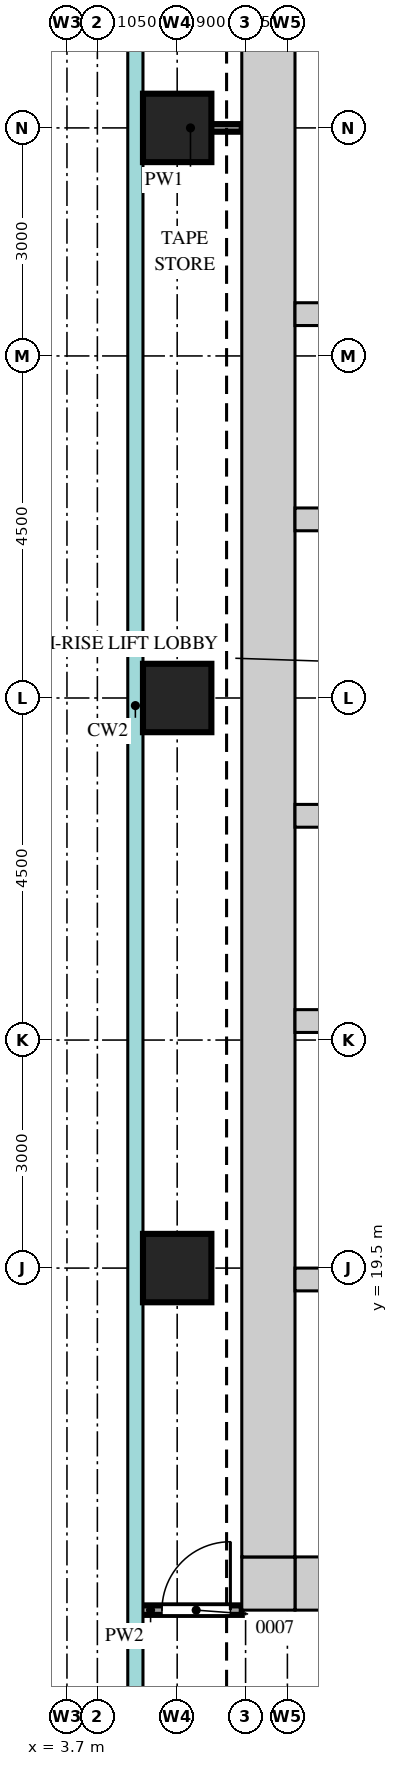
"""IFC4 building model, lengths in metres.
Left out: names, types, materials, properties, quantities, classifications, styles, units other than length and angle.
Written with IfcOpenShell. Run it as: python <this file> out.ifc"""

import sys

from ifc_helpers import new_model, si_unit, direction, frame, frame_2d, origin, origin_2d, place, context, subcontext, project, spatial, rectangle, extrude, source, transform, mapped, element, fill, save


model = new_model("IFC4")
c1 = context("Model", 3, precision=1e-05, world=origin(), true_north=direction((0.0, 1.0)))
c2 = subcontext(c1, "Body", "Model", "MODEL_VIEW")
j1 = project(units=[si_unit("LENGTHUNIT", "METRE"), si_unit("PLANEANGLEUNIT", "RADIAN")], contexts=[c1])
p1 = place(None, origin())
s1 = spatial("IfcSite", under=j1, at=p1, CompositionType="ELEMENT")
p2 = place(p1, origin())
s2 = spatial("IfcBuilding", under=s1, at=p2, CompositionType="ELEMENT")
p3 = place(p2, frame((0.0, 0.0, 250.2)))
s3 = spatial("IfcBuildingStorey", under=s2, at=p3, CompositionType="ELEMENT", Elevation=250.2)
m1 = source(origin(), c2, "Body", "SweptSolid", [
    extrude(rectangle(XDim=13.6, YDim=0.7, at=frame_2d((6.8, 0.0))), origin(), (0.0, 0.0, 1.0), 3.75),
])
p4 = place(p3, frame((6.7, 15.35, 0.0), z_axis=(0.0, 0.0, 1.0), x_axis=(1.0, 0.0, 0.0)))
e1 = element("IfcWall", 1, at=p4, inside=s3, PredefinedType="SHEAR", context=c2, shape_type="MappedRepresentation", body=[
    mapped(m1, transform((0.0, 0.0, 0.0))),
])
m2 = source(origin(), c2, "Body", "SweptSolid", [
    extrude(rectangle(XDim=1.2, YDim=2.1, at=frame_2d((0.6, 1.05))), frame((0.0, 0.36, 0.0), z_axis=(0.0, -1.0, 0.0), x_axis=(1.0, 0.0, 0.0)), (0.0, 0.0, 1.0), 0.72),
])
p5 = place(p4, frame((5.5, 0.0, 0.0)))
e2 = element("IfcOpeningElement", 2, at=p5, cuts=e1, PredefinedType="OPENING", context=c2, shape_type="MappedRepresentation", body=[
    mapped(m2, transform((0.0, 0.0, 0.0))),
])
p6 = place(p4, frame((2.15, 0.0, 0.0)))
e3 = element("IfcOpeningElement", 3, at=p6, cuts=e1, PredefinedType="OPENING", context=c2, shape_type="MappedRepresentation", body=[
    mapped(m2, transform((0.0, 0.0, 0.0))),
])
m3 = source(origin(), c2, "Body", "SweptSolid", [
    extrude(rectangle(XDim=1.0, YDim=2.1, at=frame_2d((0.5, 1.05))), frame((0.0, 0.36, 0.0), z_axis=(0.0, -1.0, 0.0), x_axis=(1.0, 0.0, 0.0)), (0.0, 0.0, 1.0), 0.72),
])
p7 = place(p4, frame((8.0, 0.0, 0.0)))
e4 = element("IfcOpeningElement", 4, at=p7, cuts=e1, PredefinedType="OPENING", context=c2, shape_type="MappedRepresentation", body=[
    mapped(m3, transform((0.0, 0.0, 0.0))),
])
m4 = source(origin(), c2, "Body", "SweptSolid", [
    extrude(rectangle(XDim=0.7, YDim=0.7, at=frame_2d((0.35, 0.0))), origin(), (0.0, 0.0, 1.0), 3.75),
])
p8 = place(p3, frame((6.0, 15.35, 0.0), z_axis=(0.0, 0.0, 1.0), x_axis=(1.0, 0.0, 0.0)))
e5 = element("IfcWall", 5, at=p8, inside=s3, PredefinedType="SHEAR", context=c2, shape_type="MappedRepresentation", body=[
    mapped(m4, transform((0.0, 0.0, 0.0))),
])
m5 = source(origin(), c2, "Body", "SweptSolid", [
    extrude(rectangle(XDim=22.6, YDim=0.7, at=frame_2d((11.3, 0.0))), origin(), (0.0, 0.0, 1.0), 3.75),
])
p9 = place(p3, frame((6.35, 15.7, 0.0), z_axis=(0.0, 0.0, 1.0), x_axis=(0.0, 1.0, 0.0)))
e6 = element("IfcWall", 6, at=p9, inside=s3, PredefinedType="SHEAR", context=c2, shape_type="MappedRepresentation", body=[
    mapped(m5, transform((0.0, 0.0, 0.0))),
])
m6 = source(origin(), c2, "Body", "SweptSolid", [
    extrude(rectangle(XDim=13.6, YDim=0.3, at=frame_2d((6.8, 0.0))), origin(), (0.0, 0.0, 1.0), 3.75),
])
p10 = place(p3, frame((6.7, 22.75, 0.0), z_axis=(0.0, 0.0, 1.0), x_axis=(1.0, 0.0, 0.0)))
e7 = element("IfcWall", 7, at=p10, inside=s3, PredefinedType="STANDARD", context=c2, shape_type="MappedRepresentation", body=[
    mapped(m6, transform((0.0, 0.0, 0.0))),
])
m7 = source(origin(), c2, "Body", "SweptSolid", [
    extrude(rectangle(XDim=9.375, YDim=0.3, at=frame_2d((4.688, 0.0))), origin(), (0.0, 0.0, 1.0), 3.75),
])
p11 = place(p3, frame((6.7, 19.35, 0.0), z_axis=(0.0, 0.0, 1.0), x_axis=(1.0, 0.0, 0.0)))
e8 = element("IfcWall", 8, at=p11, inside=s3, PredefinedType="STANDARD", context=c2, shape_type="MappedRepresentation", body=[
    mapped(m7, transform((0.0, 0.0, 0.0))),
])
m8 = source(origin(), c2, "Body", "SweptSolid", [
    extrude(rectangle(XDim=1.2, YDim=2.1, at=frame_2d((0.6, 1.05))), frame((0.0, 0.16, 0.0), z_axis=(0.0, -1.0, 0.0), x_axis=(1.0, 0.0, 0.0)), (0.0, 0.0, 1.0), 0.32),
])
p12 = place(p11, frame((0.95, 0.0, 0.0)))
e9 = element("IfcOpeningElement", 9, at=p12, cuts=e8, PredefinedType="OPENING", context=c2, shape_type="MappedRepresentation", body=[
    mapped(m8, transform((0.0, 0.0, 0.0))),
])
p13 = place(p11, frame((3.3, 0.0, 0.0)))
e10 = element("IfcOpeningElement", 10, at=p13, cuts=e8, PredefinedType="OPENING", context=c2, shape_type="MappedRepresentation", body=[
    mapped(m8, transform((0.0, 0.0, 0.0))),
])
p14 = place(p11, frame((5.55, 0.0, 0.0)))
e11 = element("IfcOpeningElement", 11, at=p14, cuts=e8, PredefinedType="OPENING", context=c2, shape_type="MappedRepresentation", body=[
    mapped(m8, transform((0.0, 0.0, 0.0))),
])
p15 = place(p11, frame((7.7, 0.0, 0.0)))
e12 = element("IfcOpeningElement", 12, at=p15, cuts=e8, PredefinedType="OPENING", context=c2, shape_type="MappedRepresentation", body=[
    mapped(m8, transform((0.0, 0.0, 0.0))),
])
p16 = place(p3, frame((6.7, 32.05, 0.0), z_axis=(0.0, 0.0, 1.0), x_axis=(1.0, 0.0, 0.0)))
e13 = element("IfcWall", 13, at=p16, inside=s3, PredefinedType="STANDARD", context=c2, shape_type="MappedRepresentation", body=[
    mapped(m6, transform((0.0, 0.0, 0.0))),
])
p17 = place(p3, frame((6.7, 29.35, 0.0), z_axis=(0.0, 0.0, 1.0), x_axis=(1.0, 0.0, 0.0)))
e14 = element("IfcWall", 14, at=p17, inside=s3, PredefinedType="STANDARD", context=c2, shape_type="MappedRepresentation", body=[
    mapped(m6, transform((0.0, 0.0, 0.0))),
])
p18 = place(p17, frame((1.05, 0.0, 0.0)))
e15 = element("IfcOpeningElement", 15, at=p18, cuts=e14, PredefinedType="OPENING", context=c2, shape_type="MappedRepresentation", body=[
    mapped(m8, transform((0.0, 0.0, 0.0))),
])
p19 = place(p17, frame((3.6, 0.0, 0.0)))
e16 = element("IfcOpeningElement", 16, at=p19, cuts=e14, PredefinedType="OPENING", context=c2, shape_type="MappedRepresentation", body=[
    mapped(m8, transform((0.0, 0.0, 0.0))),
])
p20 = place(p17, frame((6.15, 0.0, 0.0)))
e17 = element("IfcOpeningElement", 17, at=p20, cuts=e14, PredefinedType="OPENING", context=c2, shape_type="MappedRepresentation", body=[
    mapped(m8, transform((0.0, 0.0, 0.0))),
])
p21 = place(p17, frame((8.7, 0.0, 0.0)))
e18 = element("IfcOpeningElement", 18, at=p21, cuts=e14, PredefinedType="OPENING", context=c2, shape_type="MappedRepresentation", body=[
    mapped(m8, transform((0.0, 0.0, 0.0))),
])
p22 = place(p17, frame((11.25, 0.0, 0.0)))
e19 = element("IfcOpeningElement", 19, at=p22, cuts=e14, PredefinedType="OPENING", context=c2, shape_type="MappedRepresentation", body=[
    mapped(m8, transform((0.0, 0.0, 0.0))),
])
p23 = place(p3, frame((6.7, 25.45, 0.0), z_axis=(0.0, 0.0, 1.0), x_axis=(1.0, 0.0, 0.0)))
e20 = element("IfcWall", 20, at=p23, inside=s3, PredefinedType="STANDARD", context=c2, shape_type="MappedRepresentation", body=[
    mapped(m6, transform((0.0, 0.0, 0.0))),
])
p24 = place(p23, frame((1.05, 0.0, 0.0)))
e21 = element("IfcOpeningElement", 21, at=p24, cuts=e20, PredefinedType="OPENING", context=c2, shape_type="MappedRepresentation", body=[
    mapped(m8, transform((0.0, 0.0, 0.0))),
])
p25 = place(p23, frame((3.6, 0.0, 0.0)))
e22 = element("IfcOpeningElement", 22, at=p25, cuts=e20, PredefinedType="OPENING", context=c2, shape_type="MappedRepresentation", body=[
    mapped(m8, transform((0.0, 0.0, 0.0))),
])
p26 = place(p23, frame((6.15, 0.0, 0.0)))
e23 = element("IfcOpeningElement", 23, at=p26, cuts=e20, PredefinedType="OPENING", context=c2, shape_type="MappedRepresentation", body=[
    mapped(m8, transform((0.0, 0.0, 0.0))),
])
p27 = place(p23, frame((8.7, 0.0, 0.0)))
e24 = element("IfcOpeningElement", 24, at=p27, cuts=e20, PredefinedType="OPENING", context=c2, shape_type="MappedRepresentation", body=[
    mapped(m8, transform((0.0, 0.0, 0.0))),
])
p28 = place(p23, frame((11.25, 0.0, 0.0)))
e25 = element("IfcOpeningElement", 25, at=p28, cuts=e20, PredefinedType="OPENING", context=c2, shape_type="MappedRepresentation", body=[
    mapped(m8, transform((0.0, 0.0, 0.0))),
])
m9 = source(origin(), c2, "Body", "SweptSolid", [
    extrude(rectangle(XDim=0.9, YDim=0.9, at=origin_2d()), origin(), (0.0, 0.0, 1.0), 3.75),
])
for number, where, z_axis, x_axis in (
    (26, (5.15, 19.5, 0.0), (0.0, 0.0, 1.0), (1.0, 0.0, 0.0)),
    (27, (5.15, 27.0, 0.0), (0.0, 0.0, 1.0), (1.0, 0.0, 0.0)),
    (28, (5.15, 34.5, 0.0), (0.0, 0.0, 1.0), (1.0, 0.0, 0.0)),
):
    element("IfcColumn", number, at=place(p3, frame(where, z_axis=z_axis, x_axis=x_axis)), inside=s3, PredefinedType="COLUMN", context=c2, shape_type="MappedRepresentation", body=[
        mapped(m9, transform((0.0, 0.0, 0.0))),
    ])
m10 = source(origin(), c2, "Body", "SweptSolid", [
    extrude(rectangle(XDim=1.35, YDim=0.125, at=frame_2d((0.675, 0.0))), origin(), (0.0, 0.0, 1.0), 3.8),
])
p29 = place(p3, frame((4.65, 15.0, 0.0), z_axis=(0.0, 0.0, 1.0), x_axis=(1.0, 0.0, 0.0)))
e29 = element("IfcWall", 29, at=p29, inside=s3, PredefinedType="PARTITIONING", context=c2, shape_type="MappedRepresentation", body=[
    mapped(m10, transform((0.0, 0.0, 0.0))),
])
m11 = source(origin(), c2, "Body", "SweptSolid", [
    extrude(rectangle(XDim=0.9, YDim=2.1, at=frame_2d((0.45, 1.05))), frame((0.0, 0.073, 0.0), z_axis=(0.0, -1.0, 0.0), x_axis=(1.0, 0.0, 0.0)), (0.0, 0.0, 1.0), 0.145),
])
p30 = place(p29, frame((0.3, 0.0, 0.0)))
e30 = element("IfcOpeningElement", 30, at=p30, cuts=e29, PredefinedType="OPENING", context=c2, shape_type="MappedRepresentation", body=[
    mapped(m11, transform((0.0, 0.0, 0.0))),
])
m12 = source(origin(), c2, "Body", "SweptSolid", [
    extrude(rectangle(XDim=1.35, YDim=0.1, at=frame_2d((0.675, 0.0))), origin(), (0.0, 0.0, 1.0), 3.8),
])
p31 = place(p3, frame((4.65, 34.5, 0.0), z_axis=(0.0, 0.0, 1.0), x_axis=(1.0, 0.0, 0.0)))
e31 = element("IfcWall", 31, at=p31, inside=s3, PredefinedType="PARTITIONING", context=c2, shape_type="MappedRepresentation", body=[
    mapped(m12, transform((0.0, 0.0, 0.0))),
])
m13 = source(origin(), c2, "Body", "SweptSolid", [
    extrude(rectangle(XDim=0.9, YDim=2.1, at=frame_2d((0.45, 1.05))), frame((0.0, 0.025, 0.0), z_axis=(0.0, -1.0, 0.0), x_axis=(1.0, 0.0, 0.0)), (0.0, 0.0, 1.0), 0.05),
])
p32 = place(p30, origin())
e32 = element("IfcDoor", 32, at=p32, inside=s3, OperationType="SINGLE_SWING_LEFT", PredefinedType="DOOR", context=c2, shape_type="MappedRepresentation", body=[
    mapped(m13, transform((0.0, 0.0, 0.0))),
])
fill(e30, e32)
save(model, sys.argv[1])
